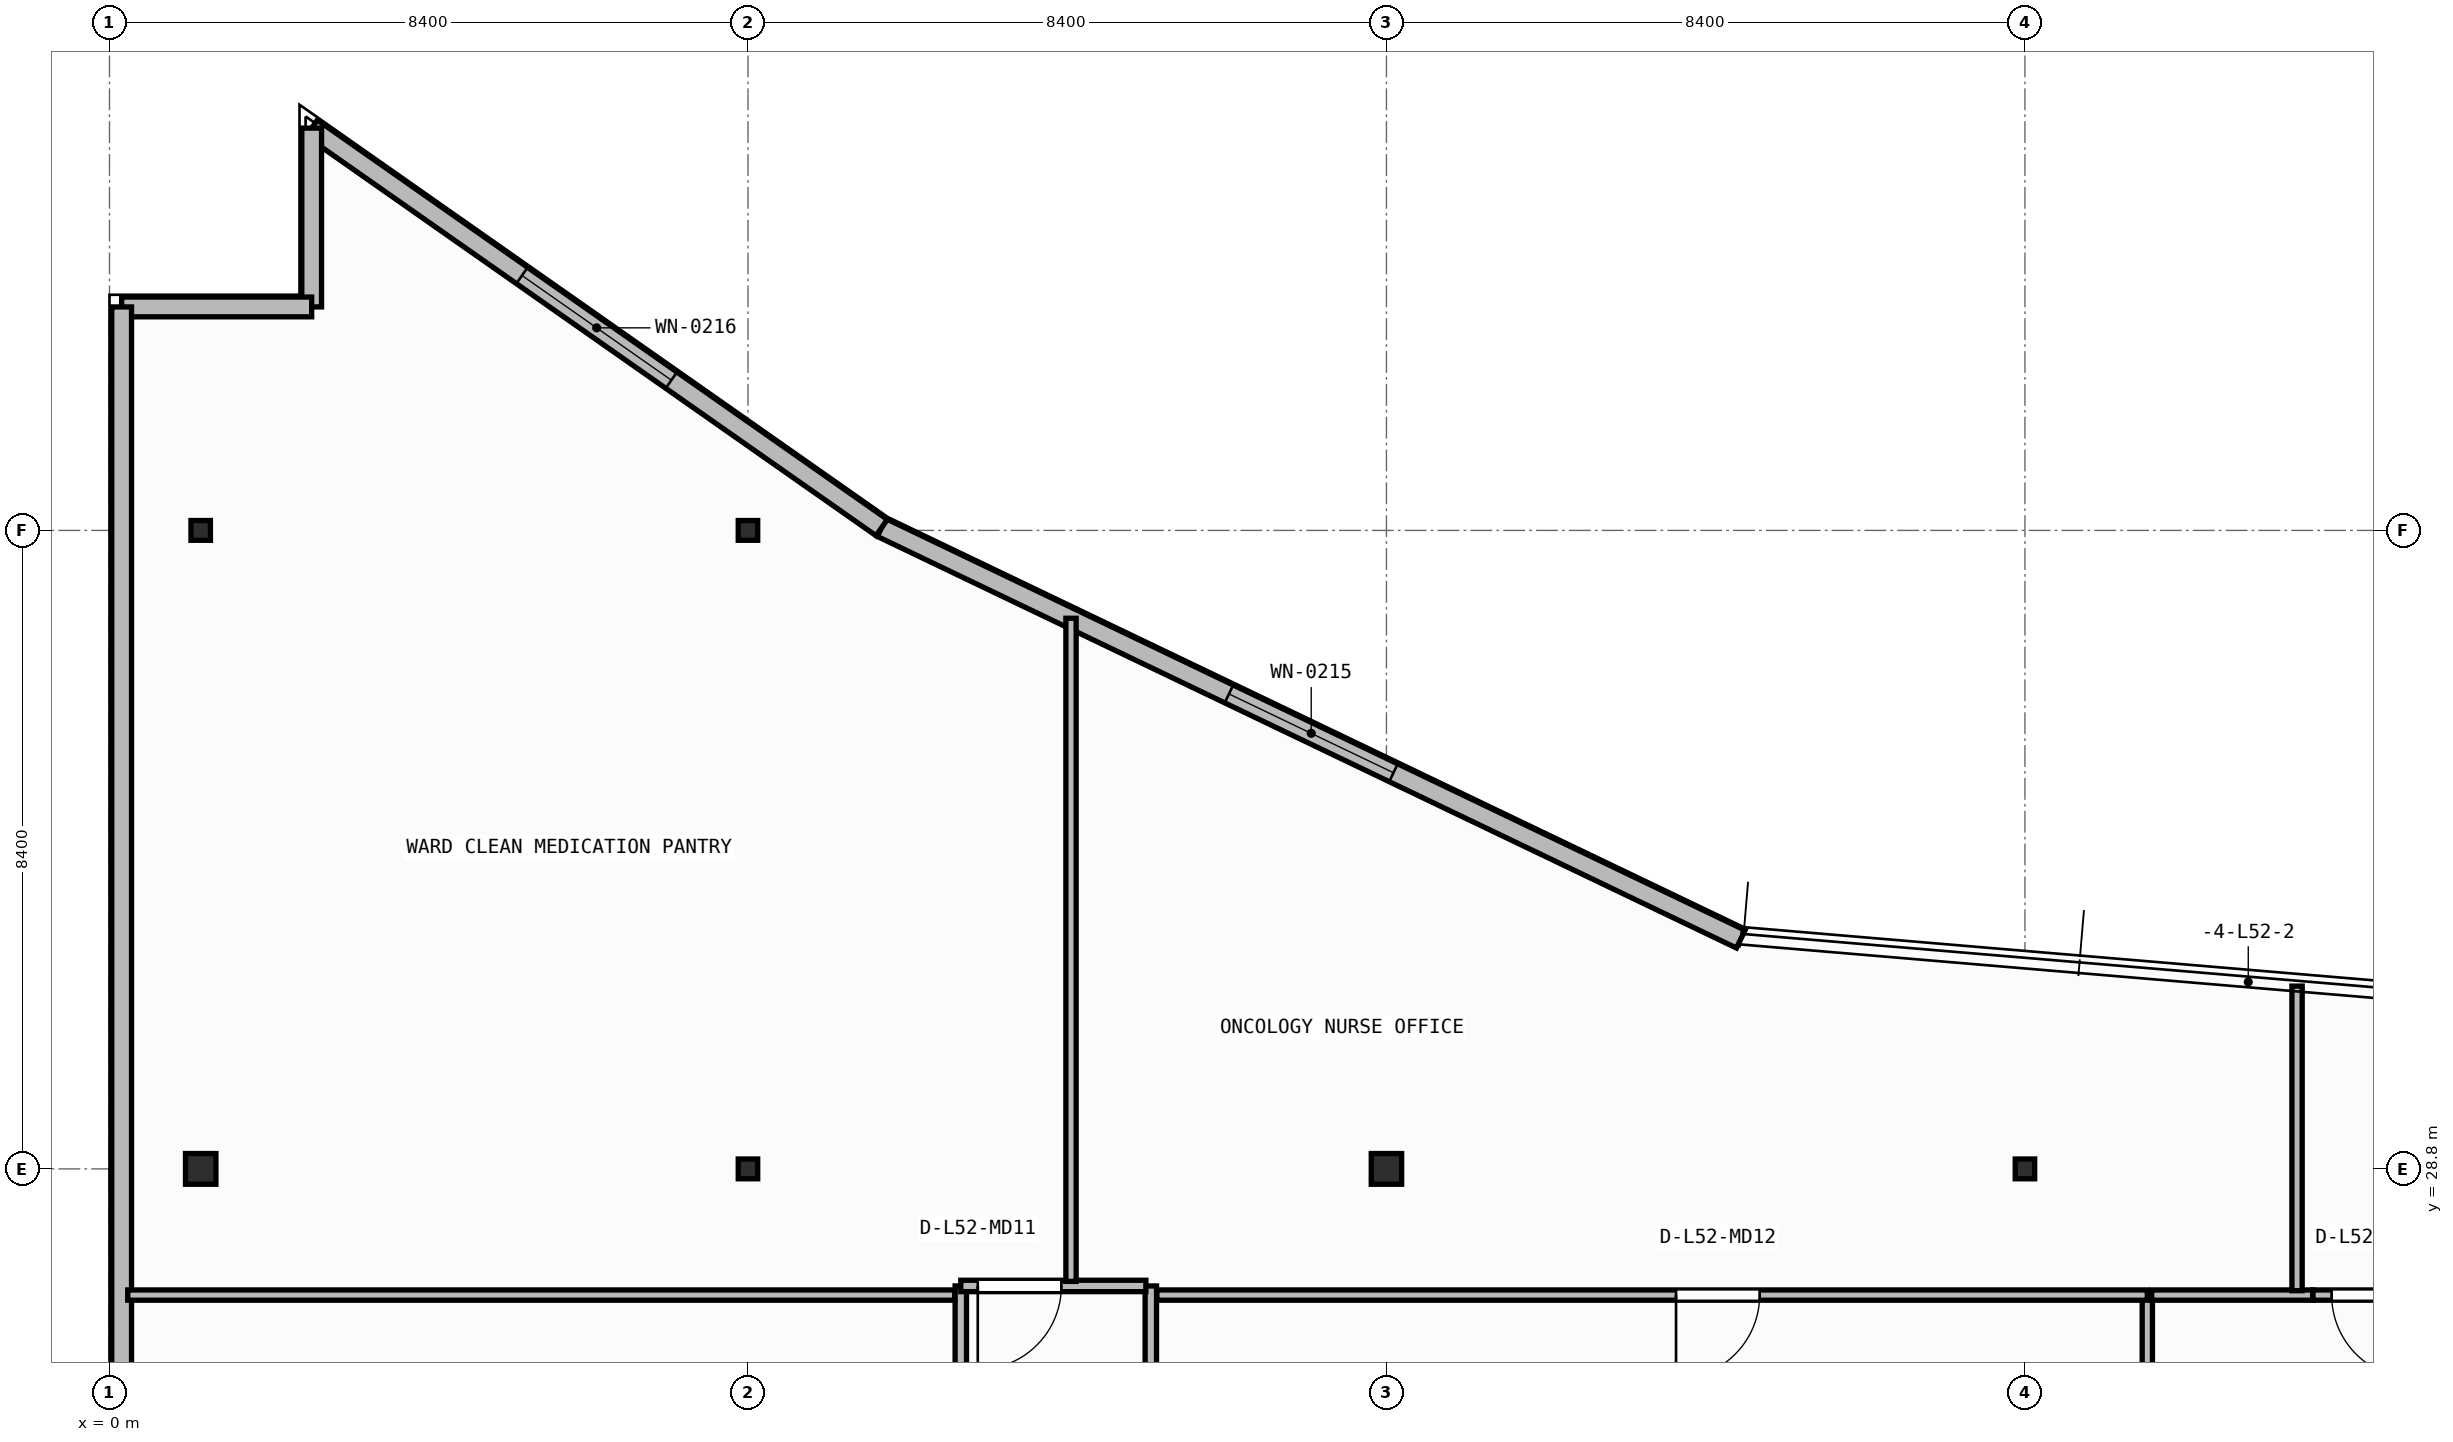
"""IFC4 building model, lengths in metres.
Left out: names, types, materials, properties, quantities, classifications, styles, units other than length and angle.
Written with IfcOpenShell. Run it as: python <this file> out.ifc"""

import sys

from ifc_helpers import new_model, si_unit, direction, frame, frame_2d, origin, origin_2d, place, context, subcontext, project, spatial, rectangle, i_section, extrude, element, fill, save


model = new_model("IFC4")
c1 = context("Model", 3, precision=1e-05, world=origin(), true_north=direction((0.0, 1.0)))
c2 = subcontext(c1, "Body", "Model", "MODEL_VIEW")
j1 = project(units=[si_unit("LENGTHUNIT", "METRE"), si_unit("PLANEANGLEUNIT", "RADIAN")], contexts=[c1])
p1 = place(None, origin())
s1 = spatial("IfcSite", under=j1, at=p1, CompositionType="ELEMENT")
p2 = place(p1, origin())
s2 = spatial("IfcBuilding", under=s1, at=p2, CompositionType="ELEMENT")
p3 = place(p2, frame((0.0, 0.0, 211.85)))
s3 = spatial("IfcBuildingStorey", under=s2, at=p3, CompositionType="ELEMENT", Elevation=211.85)
p4 = place(p3, frame((1.2, 28.8, 0.0), z_axis=(0.0, 0.0, 1.0), x_axis=(1.0, 0.0, 0.0)))
e1 = element("IfcColumn", 1, at=p4, inside=s3, PredefinedType="COLUMN", context=c2, shape_type="SweptSolid", body=[
    extrude(i_section(OverallWidth=0.4, OverallDepth=0.404, WebThickness=0.02, FlangeThickness=0.032, at=origin_2d()), origin(), (0.0, 0.0, 1.0), 3.95),
])
p5 = place(p3, frame((8.4, 28.8, 0.0), z_axis=(0.0, 0.0, 1.0), x_axis=(1.0, 0.0, 0.0)))
e2 = element("IfcColumn", 2, at=p5, inside=s3, PredefinedType="COLUMN", context=c2, shape_type="SweptSolid", body=[
    extrude(i_section(OverallWidth=0.256, OverallDepth=0.26, WebThickness=0.01, FlangeThickness=0.017, FilletRadius=0.013, at=origin_2d()), origin(), (0.0, 0.0, 1.0), 3.95),
])
p6 = place(p3, frame((16.8, 28.8, 0.0), z_axis=(0.0, 0.0, 1.0), x_axis=(1.0, 0.0, 0.0)))
e3 = element("IfcColumn", 3, at=p6, inside=s3, PredefinedType="COLUMN", context=c2, shape_type="SweptSolid", body=[
    extrude(i_section(OverallWidth=0.4, OverallDepth=0.404, WebThickness=0.02, FlangeThickness=0.032, at=origin_2d()), origin(), (0.0, 0.0, 1.0), 3.95),
])
for number, where, z_axis, x_axis in (
    (4, (25.2, 28.8, 0.0), (0.0, 0.0, 1.0), (1.0, 0.0, 0.0)),
    (5, (1.2, 37.2, 0.0), (0.0, 0.0, 1.0), (1.0, 0.0, 0.0)),
    (6, (8.4, 37.2, 0.0), (0.0, 0.0, 1.0), (1.0, 0.0, 0.0)),
):
    element("IfcColumn", number, at=place(p3, frame(where, z_axis=z_axis, x_axis=x_axis)), inside=s3, PredefinedType="COLUMN", context=c2, shape_type="SweptSolid", body=[
        extrude(i_section(OverallWidth=0.256, OverallDepth=0.26, WebThickness=0.01, FlangeThickness=0.017, FilletRadius=0.013, at=origin_2d()), origin(), (0.0, 0.0, 1.0), 3.95),
    ])
p7 = place(p3, frame((21.461, 31.823, 0.0), z_axis=(0.0, 0.0, 1.0), x_axis=(-0.901858094827, 0.432032379336, 0.0)))
e7 = element("IfcWall", 7, at=p7, inside=s3, PredefinedType="STANDARD", context=c2, shape_type="SweptSolid", body=[
    extrude(rectangle(XDim=12.532, YDim=0.26, at=frame_2d((6.266, 0.0))), origin(), (0.0, 0.0, 1.0), 3.71),
])
p8 = place(p7, frame((5.066, 0.0, 0.9)))
e8 = element("IfcOpeningElement", 8, at=p8, cuts=e7, PredefinedType="OPENING", context=c2, shape_type="SweptSolid", body=[
    extrude(rectangle(XDim=2.4, YDim=1.65, at=frame_2d((1.2, 0.825))), frame((0.0, 0.14, 0.0), z_axis=(0.0, -1.0, 0.0), x_axis=(1.0, 0.0, 0.0)), (0.0, 0.0, 1.0), 0.28),
])
p9 = place(p3, frame((10.159, 37.237, 0.0), z_axis=(0.0, 0.0, 1.0), x_axis=(-0.818933702389, 0.57388813465, 0.0)))
e9 = element("IfcWall", 9, at=p9, inside=s3, PredefinedType="STANDARD", context=c2, shape_type="SweptSolid", body=[
    extrude(rectangle(XDim=9.157, YDim=0.26, at=frame_2d((4.579, 0.0))), origin(), (0.0, 0.0, 1.0), 3.71),
])
p10 = place(p9, frame((3.378, 0.0, 0.9)))
e10 = element("IfcOpeningElement", 10, at=p10, cuts=e9, PredefinedType="OPENING", context=c2, shape_type="SweptSolid", body=[
    extrude(rectangle(XDim=2.4, YDim=1.65, at=frame_2d((1.2, 0.825))), frame((0.0, 0.14, 0.0), z_axis=(0.0, -1.0, 0.0), x_axis=(1.0, 0.0, 0.0)), (0.0, 0.0, 1.0), 0.28),
])
p11 = place(p3, frame((2.66, 42.492, 0.0), z_axis=(0.0, 0.0, 1.0), x_axis=(0.0, -1.0, 0.0)))
e11 = element("IfcWall", 11, at=p11, inside=s3, PredefinedType="STANDARD", context=c2, shape_type="SweptSolid", body=[
    extrude(rectangle(XDim=2.353, YDim=0.26, at=frame_2d((1.176, 0.0))), origin(), (0.0, 0.0, 1.0), 3.71),
])
p12 = place(p3, frame((2.66, 40.14, 0.0), z_axis=(0.0, 0.0, 1.0), x_axis=(-1.0, 0.0, 0.0)))
e12 = element("IfcWall", 12, at=p12, inside=s3, PredefinedType="STANDARD", context=c2, shape_type="SweptSolid", body=[
    extrude(rectangle(XDim=2.5, YDim=0.26, at=frame_2d((1.25, 0.0))), origin(), (0.0, 0.0, 1.0), 3.71),
])
p13 = place(p3, frame((0.16, 40.14, 0.0), z_axis=(0.0, 0.0, 1.0), x_axis=(0.0, -1.0, 0.0)))
e13 = element("IfcWall", 13, at=p13, inside=s3, PredefinedType="STANDARD", context=c2, shape_type="SweptSolid", body=[
    extrude(rectangle(XDim=37.48, YDim=0.26, at=frame_2d((18.74, 0.0))), origin(), (0.0, 0.0, 1.0), 3.71),
])
p14 = place(p13, frame((27.4, 0.0, 0.9)))
e14 = element("IfcOpeningElement", 14, at=p14, cuts=e13, PredefinedType="OPENING", context=c2, shape_type="SweptSolid", body=[
    extrude(rectangle(XDim=2.4, YDim=1.65, at=frame_2d((1.2, 0.825))), frame((0.0, 0.14, 0.0), z_axis=(0.0, -1.0, 0.0), x_axis=(1.0, 0.0, 0.0)), (0.0, 0.0, 1.0), 0.28),
])
p15 = place(p3, frame((11.2, 27.26, 0.0), z_axis=(0.0, 0.0, 1.0), x_axis=(0.0, -1.0, 0.0)))
e15 = element("IfcWall", 15, at=p15, inside=s3, PredefinedType="PARTITIONING", context=c2, shape_type="SweptSolid", body=[
    extrude(rectangle(XDim=6.592, YDim=0.15, at=frame_2d((3.296, 0.0))), origin(), (0.0, 0.0, 1.0), 3.71),
])
p16 = place(p15, frame((2.746, 0.0, 0.0)))
e16 = element("IfcOpeningElement", 16, at=p16, cuts=e15, PredefinedType="OPENING", context=c2, shape_type="SweptSolid", body=[
    extrude(rectangle(XDim=1.1, YDim=2.1, at=frame_2d((0.55, 1.05))), frame((0.0, 0.085, 0.0), z_axis=(0.0, -1.0, 0.0), x_axis=(1.0, 0.0, 0.0)), (0.0, 0.0, 1.0), 0.17),
])
p17 = place(p3, frame((13.7, 20.668, 0.0), z_axis=(0.0, 0.0, 1.0), x_axis=(0.0, 1.0, 0.0)))
e17 = element("IfcWall", 17, at=p17, inside=s3, PredefinedType="PARTITIONING", context=c2, shape_type="SweptSolid", body=[
    extrude(rectangle(XDim=6.592, YDim=0.15, at=frame_2d((3.296, 0.0))), origin(), (0.0, 0.0, 1.0), 3.71),
])
p18 = place(p17, frame((2.746, 0.0, 0.0)))
e18 = element("IfcOpeningElement", 18, at=p18, cuts=e17, PredefinedType="OPENING", context=c2, shape_type="SweptSolid", body=[
    extrude(rectangle(XDim=1.1, YDim=2.1, at=frame_2d((0.55, 1.05))), frame((0.0, 0.085, 0.0), z_axis=(0.0, -1.0, 0.0), x_axis=(1.0, 0.0, 0.0)), (0.0, 0.0, 1.0), 0.17),
])
p19 = place(p3, frame((13.635, 27.26, 0.0), z_axis=(0.0, 0.0, 1.0), x_axis=(-1.0, 0.0, 0.0)))
e19 = element("IfcWall", 19, at=p19, inside=s3, PredefinedType="PARTITIONING", context=c2, shape_type="SweptSolid", body=[
    extrude(rectangle(XDim=2.435, YDim=0.15, at=frame_2d((1.218, 0.0))), origin(), (0.0, 0.0, 1.0), 3.71),
])
p20 = place(p19, frame((1.112, 0.0, 0.0)))
e20 = element("IfcOpeningElement", 20, at=p20, cuts=e19, PredefinedType="OPENING", context=c2, shape_type="SweptSolid", body=[
    extrude(rectangle(XDim=1.1, YDim=2.1, at=frame_2d((0.55, 1.05))), frame((0.0, 0.085, 0.0), z_axis=(0.0, -1.0, 0.0), x_axis=(1.0, 0.0, 0.0)), (0.0, 0.0, 1.0), 0.17),
])
p21 = place(p3, frame((11.12, 27.14, 0.0), z_axis=(0.0, 0.0, 1.0), x_axis=(-1.0, 0.0, 0.0)))
e21 = element("IfcWall", 21, at=p21, inside=s3, PredefinedType="PARTITIONING", context=c2, shape_type="SweptSolid", body=[
    extrude(rectangle(XDim=10.88, YDim=0.135, at=frame_2d((5.44, 0.0))), origin(), (0.0, 0.0, 1.0), 3.71),
])
p22 = place(p3, frame((26.81, 20.498, 0.0), z_axis=(0.0, 0.0, 1.0), x_axis=(0.0, 1.0, 0.0)))
e22 = element("IfcWall", 22, at=p22, inside=s3, PredefinedType="PARTITIONING", context=c2, shape_type="SweptSolid", body=[
    extrude(rectangle(XDim=6.642, YDim=0.135, at=frame_2d((3.321, 0.0))), origin(), (0.0, 0.0, 1.0), 3.71),
])
p23 = place(p3, frame((26.81, 27.14, 0.0), z_axis=(0.0, 0.0, 1.0), x_axis=(-1.0, 0.0, 0.0)))
e23 = element("IfcWall", 23, at=p23, inside=s3, PredefinedType="PARTITIONING", context=c2, shape_type="SweptSolid", body=[
    extrude(rectangle(XDim=13.03, YDim=0.135, at=frame_2d((6.515, 0.0))), origin(), (0.0, 0.0, 1.0), 3.71),
])
p24 = place(p23, frame((5.1, 0.0, 0.0)))
e24 = element("IfcOpeningElement", 24, at=p24, cuts=e23, PredefinedType="OPENING", context=c2, shape_type="SweptSolid", body=[
    extrude(rectangle(XDim=1.1, YDim=2.1, at=frame_2d((0.55, 1.05))), frame((0.0, 0.077, 0.0), z_axis=(0.0, -1.0, 0.0), x_axis=(1.0, 0.0, 0.0)), (0.0, 0.0, 1.0), 0.155),
])
p25 = place(p3, frame((28.988, 27.14, 0.0), z_axis=(0.0, 0.0, 1.0), x_axis=(-1.0, 0.0, 0.0)))
e25 = element("IfcWall", 25, at=p25, inside=s3, PredefinedType="PARTITIONING", context=c2, shape_type="SweptSolid", body=[
    extrude(rectangle(XDim=2.12, YDim=0.135, at=frame_2d((1.06, 0.0))), origin(), (0.0, 0.0, 1.0), 3.71),
])
p26 = place(p3, frame((32.31, 27.14, 0.0), z_axis=(0.0, 0.0, 1.0), x_axis=(-1.0, 0.0, 0.0)))
e26 = element("IfcWall", 26, at=p26, inside=s3, PredefinedType="PARTITIONING", context=c2, shape_type="SweptSolid", body=[
    extrude(rectangle(XDim=3.321, YDim=0.135, at=frame_2d((1.66, 0.0))), origin(), (0.0, 0.0, 1.0), 3.71),
])
p27 = place(p26, frame((1.975, 0.0, 0.0)))
e27 = element("IfcOpeningElement", 27, at=p27, cuts=e26, PredefinedType="OPENING", context=c2, shape_type="SweptSolid", body=[
    extrude(rectangle(XDim=1.1, YDim=2.1, at=frame_2d((0.55, 1.05))), frame((0.0, 0.077, 0.0), z_axis=(0.0, -1.0, 0.0), x_axis=(1.0, 0.0, 0.0)), (0.0, 0.0, 1.0), 0.155),
])
p28 = place(p3, frame((12.65, 27.32, 0.0), z_axis=(0.0, 0.0, 1.0), x_axis=(0.0, 1.0, 0.0)))
e28 = element("IfcWall", 28, at=p28, inside=s3, PredefinedType="PARTITIONING", context=c2, shape_type="SweptSolid", body=[
    extrude(rectangle(XDim=8.724, YDim=0.135, at=frame_2d((4.362, 0.0))), origin(), (0.0, 0.0, 1.0), 3.71),
])
p29 = place(p3, frame((28.78, 27.198, 0.0), z_axis=(0.0, 0.0, 1.0), x_axis=(0.0, 1.0, 0.0)))
e29 = element("IfcWall", 29, at=p29, inside=s3, PredefinedType="PARTITIONING", context=c2, shape_type="SweptSolid", body=[
    extrude(rectangle(XDim=4.008, YDim=0.135, at=frame_2d((2.004, 0.0))), origin(), (0.0, 0.0, 1.0), 3.71),
])
p30 = place(p8, origin())
e30 = element("IfcWindow", 30, at=p30, inside=s3, PartitioningType="SINGLE_PANEL", PredefinedType="WINDOW", context=c2, shape_type="SweptSolid", body=[
    extrude(rectangle(XDim=2.4, YDim=1.65, at=frame_2d((1.2, 0.825))), frame((0.0, 0.03, 0.0), z_axis=(0.0, -1.0, 0.0), x_axis=(1.0, 0.0, 0.0)), (0.0, 0.0, 1.0), 0.06),
])
fill(e8, e30)
p31 = place(p10, origin())
e31 = element("IfcWindow", 31, at=p31, inside=s3, PartitioningType="SINGLE_PANEL", PredefinedType="WINDOW", context=c2, shape_type="SweptSolid", body=[
    extrude(rectangle(XDim=2.4, YDim=1.65, at=frame_2d((1.2, 0.825))), frame((0.0, 0.03, 0.0), z_axis=(0.0, -1.0, 0.0), x_axis=(1.0, 0.0, 0.0)), (0.0, 0.0, 1.0), 0.06),
])
fill(e10, e31)
p32 = place(p20, origin())
e32 = element("IfcDoor", 32, at=p32, inside=s3, OperationType="SINGLE_SWING_RIGHT", PredefinedType="DOOR", context=c2, shape_type="SweptSolid", body=[
    extrude(rectangle(XDim=1.1, YDim=2.1, at=frame_2d((0.55, 1.05))), frame((0.0, 0.025, 0.0), z_axis=(0.0, -1.0, 0.0), x_axis=(1.0, 0.0, 0.0)), (0.0, 0.0, 1.0), 0.05),
])
fill(e20, e32)
p33 = place(p24, origin())
e33 = element("IfcDoor", 33, at=p33, inside=s3, OperationType="SINGLE_SWING_RIGHT", PredefinedType="DOOR", context=c2, shape_type="SweptSolid", body=[
    extrude(rectangle(XDim=1.1, YDim=2.1, at=frame_2d((0.55, 1.05))), frame((0.0, 0.025, 0.0), z_axis=(0.0, -1.0, 0.0), x_axis=(1.0, 0.0, 0.0)), (0.0, 0.0, 1.0), 0.05),
])
fill(e24, e33)
p34 = place(p27, origin())
e34 = element("IfcDoor", 34, at=p34, inside=s3, OperationType="SINGLE_SWING_LEFT", PredefinedType="DOOR", context=c2, shape_type="SweptSolid", body=[
    extrude(rectangle(XDim=1.1, YDim=2.1, at=frame_2d((0.55, 1.05))), frame((0.0, 0.025, 0.0), z_axis=(0.0, -1.0, 0.0), x_axis=(1.0, 0.0, 0.0)), (0.0, 0.0, 1.0), 0.05),
])
fill(e27, e34)
save(model, sys.argv[1])
